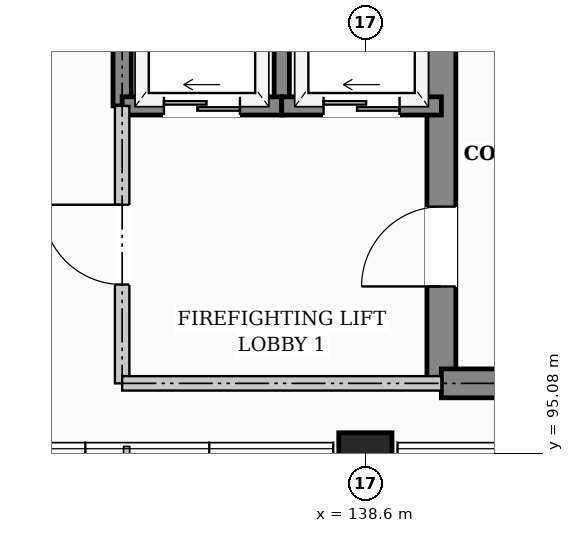
"""IFC4 building model, lengths in metres.
Left out: names, types, materials, properties, quantities, classifications, styles, units other than length and angle.
Written with IfcOpenShell. Run it as: python <this file> out.ifc"""

import sys

from ifc_helpers import new_model, si_unit, direction, frame, frame_2d, origin, origin_2d, place, context, subcontext, project, spatial, rectangle, extrude, element, fill, save


model = new_model("IFC4")
c1 = context("Model", 3, precision=1e-05, world=origin(), true_north=direction((0.0, 1.0)))
c2 = subcontext(c1, "Body", "Model", "MODEL_VIEW")
j1 = project(units=[si_unit("LENGTHUNIT", "METRE"), si_unit("PLANEANGLEUNIT", "RADIAN")], contexts=[c1])
p1 = place(None, origin())
s1 = spatial("IfcSite", under=j1, at=p1, CompositionType="ELEMENT")
p2 = place(p1, origin())
s2 = spatial("IfcBuilding", under=s1, at=p2, CompositionType="ELEMENT")
p3 = place(p2, frame((0.0, 0.0, 16.8)))
s3 = spatial("IfcBuildingStorey", under=s2, at=p3, CompositionType="ELEMENT", Elevation=16.8)
p4 = place(p3, frame((138.6, 95.0, 0.0), z_axis=(0.0, 0.0, 1.0), x_axis=(1.0, 0.0, 0.0)))
e1 = element("IfcColumn", 1, at=p4, inside=s3, PredefinedType="COLUMN", context=c2, shape_type="SweptSolid", body=[
    extrude(rectangle(XDim=0.7, YDim=0.7, at=origin_2d()), origin(), (0.0, 0.0, 1.0), 3.6),
])
p5 = place(p3, frame((139.6, 96.0, 0.0), z_axis=(0.0, 0.0, 1.0), x_axis=(0.0, 1.0, 0.0)))
e2 = element("IfcWall", 2, at=p5, inside=s3, PredefinedType="SHEAR", context=c2, shape_type="SweptSolid", body=[
    extrude(rectangle(XDim=6.0, YDim=0.38, at=frame_2d((3.0, 0.0))), origin(), (0.0, 0.0, 1.0), 3.32),
])
p6 = place(p5, frame((1.275, 0.0, 0.0)))
e3 = element("IfcOpeningElement", 3, at=p6, cuts=e2, PredefinedType="OPENING", context=c2, shape_type="SweptSolid", body=[
    extrude(rectangle(XDim=1.05, YDim=2.15, at=frame_2d((0.525, 1.075))), frame((0.0, 0.2, 0.0), z_axis=(0.0, -1.0, 0.0), x_axis=(1.0, 0.0, 0.0)), (0.0, 0.0, 1.0), 0.4),
])
p7 = place(p3, frame((139.6, 96.0, 0.0), z_axis=(0.0, 0.0, 1.0), x_axis=(1.0, 0.0, 0.0)))
e4 = element("IfcWall", 4, at=p7, inside=s3, PredefinedType="SHEAR", context=c2, shape_type="SweptSolid", body=[
    extrude(rectangle(XDim=7.0, YDim=0.38, at=frame_2d((3.5, 0.0))), origin(), (0.0, 0.0, 1.0), 3.32),
])
p8 = place(p3, frame((135.4, 99.65, 0.0), z_axis=(0.0, 0.0, 1.0), x_axis=(0.0, 1.0, 0.0)))
e5 = element("IfcWall", 5, at=p8, inside=s3, PredefinedType="SHEAR", context=c2, shape_type="SweptSolid", body=[
    extrude(rectangle(XDim=2.35, YDim=0.24, at=frame_2d((1.175, 0.0))), origin(), (0.0, 0.0, 1.0), 3.32),
])
p9 = place(p3, frame((137.5, 99.65, 0.0), z_axis=(0.0, 0.0, 1.0), x_axis=(0.0, 1.0, 0.0)))
e6 = element("IfcWall", 6, at=p9, inside=s3, PredefinedType="SHEAR", context=c2, shape_type="SweptSolid", body=[
    extrude(rectangle(XDim=2.35, YDim=0.2, at=frame_2d((1.175, 0.0))), origin(), (0.0, 0.0, 1.0), 3.32),
])
p10 = place(p3, frame((135.4, 99.65, 0.0), z_axis=(0.0, 0.0, 1.0), x_axis=(1.0, 0.0, 0.0)))
e7 = element("IfcWall", 7, at=p10, inside=s3, PredefinedType="SHEAR", context=c2, shape_type="SweptSolid", body=[
    extrude(rectangle(XDim=2.1, YDim=0.24, at=frame_2d((1.05, 0.0))), origin(), (0.0, 0.0, 1.0), 3.32),
])
p11 = place(p10, frame((0.55, 0.0, 0.0)))
e8 = element("IfcOpeningElement", 8, at=p11, cuts=e7, PredefinedType="OPENING", context=c2, shape_type="SweptSolid", body=[
    extrude(rectangle(XDim=1.0, YDim=2.1, at=frame_2d((0.5, 1.05))), frame((0.0, 0.13, 0.0), z_axis=(0.0, -1.0, 0.0), x_axis=(1.0, 0.0, 0.0)), (0.0, 0.0, 1.0), 0.26),
])
p12 = place(p3, frame((137.5, 99.65, 0.0), z_axis=(0.0, 0.0, 1.0), x_axis=(1.0, 0.0, 0.0)))
e9 = element("IfcWall", 9, at=p12, inside=s3, PredefinedType="SHEAR", context=c2, shape_type="SweptSolid", body=[
    extrude(rectangle(XDim=2.1, YDim=0.24, at=frame_2d((1.05, 0.0))), origin(), (0.0, 0.0, 1.0), 3.32),
])
p13 = place(p12, frame((0.55, 0.0, 0.0)))
e10 = element("IfcOpeningElement", 10, at=p13, cuts=e9, PredefinedType="OPENING", context=c2, shape_type="SweptSolid", body=[
    extrude(rectangle(XDim=1.0, YDim=2.1, at=frame_2d((0.5, 1.05))), frame((0.0, 0.13, 0.0), z_axis=(0.0, -1.0, 0.0), x_axis=(1.0, 0.0, 0.0)), (0.0, 0.0, 1.0), 0.26),
])
p14 = place(p3, frame((135.4, 96.0, 0.0), z_axis=(0.0, 0.0, 1.0), x_axis=(0.0, 1.0, 0.0)))
e11 = element("IfcWall", 11, at=p14, inside=s3, PredefinedType="PARTITIONING", context=c2, shape_type="SweptSolid", body=[
    extrude(rectangle(XDim=3.65, YDim=0.19, at=frame_2d((1.825, 0.0))), origin(), (0.0, 0.0, 1.0), 3.32),
])
p15 = place(p14, frame((1.3, 0.0, 0.0)))
e12 = element("IfcOpeningElement", 12, at=p15, cuts=e11, PredefinedType="OPENING", context=c2, shape_type="SweptSolid", body=[
    extrude(rectangle(XDim=1.05, YDim=2.15, at=frame_2d((0.525, 1.075))), frame((0.0, 0.105, 0.0), z_axis=(0.0, -1.0, 0.0), x_axis=(1.0, 0.0, 0.0)), (0.0, 0.0, 1.0), 0.21),
])
p16 = place(p3, frame((135.4, 96.0, 0.0), z_axis=(0.0, 0.0, 1.0), x_axis=(1.0, 0.0, 0.0)))
e13 = element("IfcWall", 13, at=p16, inside=s3, PredefinedType="PARTITIONING", context=c2, shape_type="SweptSolid", body=[
    extrude(rectangle(XDim=4.2, YDim=0.19, at=frame_2d((2.1, 0.0))), origin(), (0.0, 0.0, 1.0), 3.32),
])
p17 = place(p6, origin())
e14 = element("IfcDoor", 14, at=p17, inside=s3, OperationType="SINGLE_SWING_LEFT", PredefinedType="DOOR", context=c2, shape_type="SweptSolid", body=[
    extrude(rectangle(XDim=1.05, YDim=2.15, at=frame_2d((0.525, 1.075))), frame((0.0, 0.025, 0.0), z_axis=(0.0, -1.0, 0.0), x_axis=(1.0, 0.0, 0.0)), (0.0, 0.0, 1.0), 0.05),
])
fill(e3, e14)
p18 = place(p11, origin())
e15 = element("IfcDoor", 15, at=p18, inside=s3, OperationType="SLIDING_TO_LEFT", PredefinedType="DOOR", context=c2, shape_type="SweptSolid", body=[
    extrude(rectangle(XDim=1.0, YDim=2.1, at=frame_2d((0.5, 1.05))), frame((0.0, 0.025, 0.0), z_axis=(0.0, -1.0, 0.0), x_axis=(1.0, 0.0, 0.0)), (0.0, 0.0, 1.0), 0.05),
])
fill(e8, e15)
p19 = place(p13, origin())
e16 = element("IfcDoor", 16, at=p19, inside=s3, OperationType="SLIDING_TO_LEFT", PredefinedType="DOOR", context=c2, shape_type="SweptSolid", body=[
    extrude(rectangle(XDim=1.0, YDim=2.1, at=frame_2d((0.5, 1.05))), frame((0.0, 0.025, 0.0), z_axis=(0.0, -1.0, 0.0), x_axis=(1.0, 0.0, 0.0)), (0.0, 0.0, 1.0), 0.05),
])
fill(e10, e16)
p20 = place(p15, origin())
e17 = element("IfcDoor", 17, at=p20, inside=s3, OperationType="SINGLE_SWING_RIGHT", PredefinedType="DOOR", context=c2, shape_type="SweptSolid", body=[
    extrude(rectangle(XDim=1.05, YDim=2.15, at=frame_2d((0.525, 1.075))), frame((0.0, 0.025, 0.0), z_axis=(0.0, -1.0, 0.0), x_axis=(1.0, 0.0, 0.0)), (0.0, 0.0, 1.0), 0.05),
])
fill(e12, e17)
save(model, sys.argv[1])
